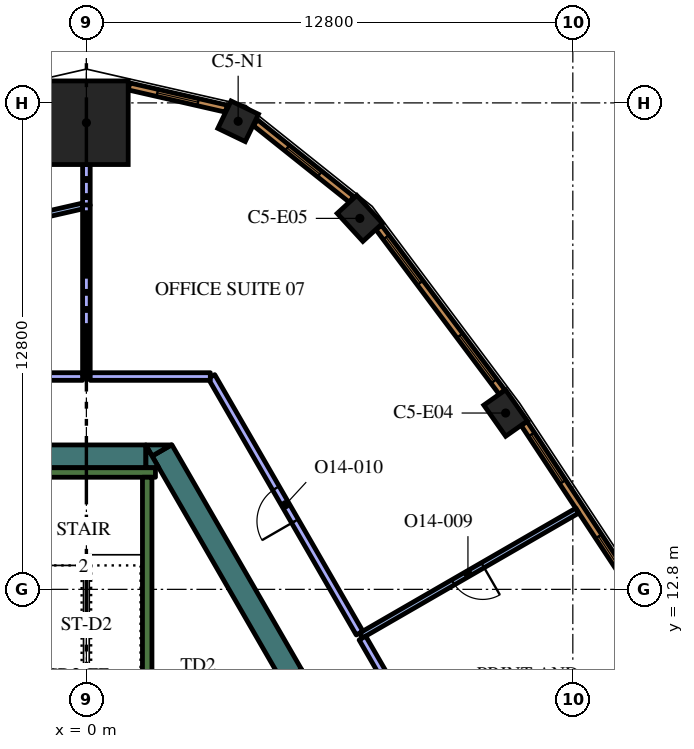
"""IFC4 building model, lengths in metres.
Left out: names, types, materials, properties, quantities, classifications, styles, units other than length and angle.
Written with IfcOpenShell. Run it as: python <this file> out.ifc"""

import sys

from ifc_helpers import new_model, si_unit, direction, frame, frame_2d, origin, origin_2d, place, context, subcontext, project, spatial, polyline, rectangle, outline, extrude, element, fill, save


model = new_model("IFC4")
c1 = context("Model", 3, precision=1e-05, world=origin(), true_north=direction((0.0, 1.0)))
c2 = subcontext(c1, "Body", "Model", "MODEL_VIEW")
j1 = project(units=[si_unit("LENGTHUNIT", "METRE"), si_unit("PLANEANGLEUNIT", "RADIAN")], contexts=[c1])
p1 = place(None, origin())
s1 = spatial("IfcSite", under=j1, at=p1, CompositionType="ELEMENT")
p2 = place(p1, origin())
s2 = spatial("IfcBuilding", under=s1, at=p2, CompositionType="ELEMENT")
p3 = place(p2, frame((0.0, 0.0, 304.8)))
s3 = spatial("IfcBuildingStorey", under=s2, at=p3, CompositionType="ELEMENT", Elevation=304.8)
p4 = place(p3, frame((0.0, 25.078, 0.0), z_axis=(0.0, 0.0, 1.0), x_axis=(0.0, 1.0, 0.0)))
e1 = element("IfcColumn", 1, at=p4, inside=s3, PredefinedType="COLUMN", context=c2, shape_type="SweptSolid", body=[
    extrude(rectangle(XDim=2.2, YDim=2.2, at=origin_2d()), origin(), (0.0, 0.0, 1.0), 4.2),
])
for number, where, z_axis, x_axis in (
    (2, (11.032, 17.44, 0.0), (0.0, 0.0, 1.0), (-0.575, 0.818, 0.0)),
    (3, (7.195, 22.561, 0.0), (0.0, 0.0, 1.0), (-0.676, 0.737, 0.0)),
):
    element("IfcColumn", number, at=place(p3, frame(where, z_axis=z_axis, x_axis=x_axis)), inside=s3, PredefinedType="COLUMN", context=c2, shape_type="SweptSolid", body=[
        extrude(rectangle(XDim=1.0, YDim=0.7, at=origin_2d()), origin(), (0.0, 0.0, 1.0), 4.2),
    ])
p5 = place(p3, frame((3.993, 25.116, 0.0), z_axis=(0.0, 0.0, 1.0), x_axis=(-0.900873321869, 0.434082086644, 0.0)))
e4 = element("IfcColumn", 4, at=p5, inside=s3, PredefinedType="COLUMN", context=c2, shape_type="SweptSolid", body=[
    extrude(rectangle(XDim=0.8, YDim=0.8, at=origin_2d()), origin(), (0.0, 0.0, 1.0), 4.2),
])
p6 = place(p3, frame((1.989, 16.456, 0.0), z_axis=(0.0, 0.0, 1.0), x_axis=(0.499973159588, -0.866040899549, 0.0)))
e5 = element("IfcWall", 5, at=p6, inside=s3, PredefinedType="SOLIDWALL", context=c2, shape_type="SweptSolid", body=[
    extrude(rectangle(XDim=6.828, YDim=0.6, at=frame_2d((3.414, 0.0))), origin(), (0.0, 0.0, 1.0), 4.2),
])
p7 = place(p3, origin())
e6 = element("IfcWall", 6, at=p7, inside=s3, PredefinedType="SOLIDWALL", context=c2, shape_type="SweptSolid", body=[
    extrude(outline(polyline([(1.559, 16.6), (2.235, 16.6), (1.728, 16.307), (1.559, 16.6)])), origin(), (0.0, 0.0, 1.0), 4.2),
])
p8 = place(p3, frame((-2.258, 16.3, 0.0), z_axis=(0.0, 0.0, 1.0), x_axis=(1.0, 0.0, 0.0)))
e7 = element("IfcWall", 7, at=p8, inside=s3, PredefinedType="SOLIDWALL", context=c2, shape_type="SweptSolid", body=[
    extrude(rectangle(XDim=3.823, YDim=0.6, at=frame_2d((1.912, 0.0))), origin(), (0.0, 0.0, 1.0), 4.2),
])
e8 = element("IfcWall", 8, at=p7, inside=s3, PredefinedType="SOLIDWALL", context=c2, shape_type="SweptSolid", body=[
    extrude(outline(polyline([(1.905, 16.0), (1.567, 16.0), (1.567, 16.585), (1.905, 16.0)])), origin(), (0.0, 0.0, 1.0), 4.2),
])
p9 = place(p3, frame((-1.817, 15.875, 0.0), z_axis=(0.0, 0.0, 1.0), x_axis=(1.0, 0.0, 0.0)))
e9 = element("IfcWall", 9, at=p9, inside=s3, PredefinedType="SOLIDWALL", context=c2, shape_type="SweptSolid", body=[
    extrude(rectangle(XDim=3.634, YDim=0.25, at=frame_2d((1.817, 0.0))), origin(), (0.0, 0.0, 1.0), 4.2),
])
p10 = place(p3, frame((1.6, 8.95, 0.0), z_axis=(0.0, 0.0, 1.0), x_axis=(0.0, 1.0, 0.0)))
e10 = element("IfcWall", 10, at=p10, inside=s3, PredefinedType="SOLIDWALL", context=c2, shape_type="SweptSolid", body=[
    extrude(rectangle(XDim=6.8, YDim=0.25, at=frame_2d((3.4, 0.0))), origin(), (0.0, 0.0, 1.0), 4.2),
])
p11 = place(p3, frame((12.918, 14.872, 0.0), z_axis=(0.0, 0.0, 1.0), x_axis=(-0.866033427365, -0.499986102494, 0.0)))
e11 = element("IfcWall", 11, at=p11, inside=s3, PredefinedType="PARTITIONING", context=c2, shape_type="SweptSolid", body=[
    extrude(rectangle(XDim=6.573, YDim=0.15, at=frame_2d((3.287, 0.0))), origin(), (0.0, 0.0, 1.0), 3.55),
])
p12 = place(p11, frame((2.873, 0.0, 0.0)))
e12 = element("IfcOpeningElement", 12, at=p12, cuts=e11, PredefinedType="OPENING", context=c2, shape_type="SweptSolid", body=[
    extrude(rectangle(XDim=0.9, YDim=2.1, at=frame_2d((0.45, 1.05))), frame((0.0, 0.085, 0.0), z_axis=(0.0, -1.0, 0.0), x_axis=(1.0, 0.0, 0.0)), (0.0, 0.0, 1.0), 0.17),
])
p13 = place(p3, frame((8.171, 9.948, 0.0), z_axis=(0.0, 0.0, 1.0), x_axis=(-0.500044545065, 0.865999684151, 0.0)))
e13 = element("IfcWall", 13, at=p13, inside=s3, PredefinedType="PARTITIONING", context=c2, shape_type="SweptSolid", body=[
    extrude(rectangle(XDim=1.815, YDim=0.2, at=frame_2d((0.908, 0.0))), origin(), (0.0, 0.0, 1.0), 3.55),
])
p14 = place(p3, frame((0.0, 22.906, 0.0), z_axis=(0.0, 0.0, 1.0), x_axis=(0.0, 1.0, 0.0)))
e14 = element("IfcWall", 14, at=p14, inside=s3, PredefinedType="PARTITIONING", context=c2, shape_type="SweptSolid", body=[
    extrude(rectangle(XDim=1.072, YDim=0.2, at=frame_2d((0.536, 0.0))), origin(), (0.0, 0.0, 1.0), 3.55),
])
p15 = place(p3, frame((0.0, 18.4, 0.0), z_axis=(0.0, 0.0, 1.0), x_axis=(0.0, 1.0, 0.0)))
e15 = element("IfcWall", 15, at=p15, inside=s3, PredefinedType="PARTITIONING", context=c2, shape_type="SweptSolid", body=[
    extrude(rectangle(XDim=4.514, YDim=0.2, at=frame_2d((2.257, 0.0))), origin(), (0.0, 0.0, 1.0), 3.55),
])
p16 = place(p3, frame((7.188, 11.65, 0.0), z_axis=(0.0, 0.0, 1.0), x_axis=(-0.499986368499, 0.866033273792, 0.0)))
e16 = element("IfcWall", 16, at=p16, inside=s3, PredefinedType="PARTITIONING", context=c2, shape_type="SweptSolid", body=[
    extrude(rectangle(XDim=7.794, YDim=0.2, at=frame_2d((3.897, 0.0))), origin(), (0.0, 0.0, 1.0), 3.55),
])
p17 = place(p16, frame((3.4, 0.0, 0.0)))
e17 = element("IfcOpeningElement", 17, at=p17, cuts=e16, PredefinedType="OPENING", context=c2, shape_type="SweptSolid", body=[
    extrude(rectangle(XDim=1.0, YDim=2.1, at=frame_2d((0.5, 1.05))), frame((0.0, 0.11, 0.0), z_axis=(0.0, -1.0, 0.0), x_axis=(1.0, 0.0, 0.0)), (0.0, 0.0, 1.0), 0.22),
])
p18 = place(p3, frame((3.261, 18.4, 0.0), z_axis=(0.0, 0.0, 1.0), x_axis=(-1.0, 0.0, 0.0)))
e18 = element("IfcWall", 18, at=p18, inside=s3, PredefinedType="PARTITIONING", context=c2, shape_type="SweptSolid", body=[
    extrude(rectangle(XDim=3.161, YDim=0.2, at=frame_2d((1.581, 0.0))), origin(), (0.0, 0.0, 1.0), 3.55),
])
p19 = place(p3, frame((-0.1, 22.887, 0.0), z_axis=(0.0, 0.0, 1.0), x_axis=(-0.974895716418, -0.222661945805, 0.0)))
e19 = element("IfcWall", 19, at=p19, inside=s3, PredefinedType="PARTITIONING", context=c2, shape_type="SweptSolid", body=[
    extrude(rectangle(XDim=2.605, YDim=0.15, at=frame_2d((1.303, 0.0))), origin(), (0.0, 0.0, 1.0), 3.55),
])
p20 = place(p3, frame((-0.1, 18.4, 0.0), z_axis=(0.0, 0.0, 1.0), x_axis=(-1.0, 0.0, 0.0)))
e20 = element("IfcWall", 20, at=p20, inside=s3, PredefinedType="PARTITIONING", context=c2, shape_type="SweptSolid", body=[
    extrude(rectangle(XDim=3.191, YDim=0.2, at=frame_2d((1.595, 0.0))), origin(), (0.0, 0.0, 1.0), 3.55),
])
p21 = place(p3, frame((14.496, 12.653, 0.0), z_axis=(0.0, 0.0, 1.0), x_axis=(-0.550744054781, 0.83467417962, 0.0)))
e21 = element("IfcWall", 21, at=p21, inside=s3, PredefinedType="SOLIDWALL", context=c2, shape_type="SweptSolid", body=[
    extrude(rectangle(XDim=5.406, YDim=0.19, at=frame_2d((2.703, 0.0))), origin(), (0.0, 0.0, 1.0), 3.95),
])
p22 = place(p21, frame((0.346, 0.0, 0.6)))
e22 = element("IfcOpeningElement", 22, at=p22, cuts=e21, PredefinedType="OPENING", context=c2, shape_type="SweptSolid", body=[
    extrude(rectangle(XDim=1.5, YDim=2.85, at=frame_2d((0.75, 1.425))), frame((0.0, 0.105, 0.0), z_axis=(0.0, -1.0, 0.0), x_axis=(1.0, 0.0, 0.0)), (0.0, 0.0, 1.0), 0.21),
])
p23 = place(p21, frame((3.559, 0.0, 0.6)))
e23 = element("IfcOpeningElement", 23, at=p23, cuts=e21, PredefinedType="OPENING", context=c2, shape_type="SweptSolid", body=[
    extrude(rectangle(XDim=1.5, YDim=2.85, at=frame_2d((0.75, 1.425))), frame((0.0, 0.105, 0.0), z_axis=(0.0, -1.0, 0.0), x_axis=(1.0, 0.0, 0.0)), (0.0, 0.0, 1.0), 0.21),
])
p24 = place(p3, frame((10.938, 17.99, 0.0), z_axis=(0.0, 0.0, 1.0), x_axis=(-0.599559865294, 0.800329911929, 0.0)))
e24 = element("IfcWall", 24, at=p24, inside=s3, PredefinedType="SOLIDWALL", context=c2, shape_type="SweptSolid", body=[
    extrude(rectangle(XDim=5.415, YDim=0.19, at=frame_2d((2.708, 0.0))), origin(), (0.0, 0.0, 1.0), 3.95),
])
p25 = place(p24, frame((0.358, 0.0, 0.6)))
e25 = element("IfcOpeningElement", 25, at=p25, cuts=e24, PredefinedType="OPENING", context=c2, shape_type="SweptSolid", body=[
    extrude(rectangle(XDim=1.5, YDim=2.85, at=frame_2d((0.75, 1.425))), frame((0.0, 0.105, 0.0), z_axis=(0.0, -1.0, 0.0), x_axis=(1.0, 0.0, 0.0)), (0.0, 0.0, 1.0), 0.21),
])
p26 = place(p24, frame((3.593, 0.0, 0.6)))
e26 = element("IfcOpeningElement", 26, at=p26, cuts=e24, PredefinedType="OPENING", context=c2, shape_type="SweptSolid", body=[
    extrude(rectangle(XDim=1.5, YDim=2.85, at=frame_2d((0.75, 1.425))), frame((0.0, 0.105, 0.0), z_axis=(0.0, -1.0, 0.0), x_axis=(1.0, 0.0, 0.0)), (0.0, 0.0, 1.0), 0.21),
])
p27 = place(p3, frame((6.977, 23.061, 0.0), z_axis=(0.0, 0.0, 1.0), x_axis=(-0.781626234064, 0.623747088349, 0.0)))
e27 = element("IfcWall", 27, at=p27, inside=s3, PredefinedType="SOLIDWALL", context=c2, shape_type="SweptSolid", body=[
    extrude(rectangle(XDim=3.237, YDim=0.19, at=frame_2d((1.618, 0.0))), origin(), (0.0, 0.0, 1.0), 3.95),
])
p28 = place(p27, frame((1.068, 0.0, 0.6)))
e28 = element("IfcOpeningElement", 28, at=p28, cuts=e27, PredefinedType="OPENING", context=c2, shape_type="SweptSolid", body=[
    extrude(rectangle(XDim=1.1, YDim=2.85, at=frame_2d((0.55, 1.425))), frame((0.0, 0.105, 0.0), z_axis=(0.0, -1.0, 0.0), x_axis=(1.0, 0.0, 0.0)), (0.0, 0.0, 1.0), 0.21),
])
p29 = place(p3, frame((3.683, 25.449, 0.0), z_axis=(0.0, 0.0, 1.0), x_axis=(-0.974913273386, 0.222585060988, 0.0)))
e29 = element("IfcWall", 29, at=p29, inside=s3, PredefinedType="SOLIDWALL", context=c2, shape_type="SweptSolid", body=[
    extrude(rectangle(XDim=2.627, YDim=0.19, at=frame_2d((1.313, 0.0))), origin(), (0.0, 0.0, 1.0), 3.95),
])
p30 = place(p29, frame((0.763, 0.0, 0.6)))
e30 = element("IfcOpeningElement", 30, at=p30, cuts=e29, PredefinedType="OPENING", context=c2, shape_type="SweptSolid", body=[
    extrude(rectangle(XDim=1.1, YDim=2.85, at=frame_2d((0.55, 1.425))), frame((0.0, 0.105, 0.0), z_axis=(0.0, -1.0, 0.0), x_axis=(1.0, 0.0, 0.0)), (0.0, 0.0, 1.0), 0.21),
])
p31 = place(p12, origin())
e31 = element("IfcDoor", 31, at=p31, inside=s3, OperationType="SINGLE_SWING_RIGHT", PredefinedType="DOOR", context=c2, shape_type="SweptSolid", body=[
    extrude(rectangle(XDim=0.9, YDim=2.1, at=frame_2d((0.45, 1.05))), frame((0.0, 0.025, 0.0), z_axis=(0.0, -1.0, 0.0), x_axis=(1.0, 0.0, 0.0)), (0.0, 0.0, 1.0), 0.05),
])
fill(e12, e31)
p32 = place(p17, origin())
e32 = element("IfcDoor", 32, at=p32, inside=s3, OperationType="SINGLE_SWING_RIGHT", PredefinedType="DOOR", context=c2, shape_type="SweptSolid", body=[
    extrude(rectangle(XDim=1.0, YDim=2.1, at=frame_2d((0.5, 1.05))), frame((0.0, 0.025, 0.0), z_axis=(0.0, -1.0, 0.0), x_axis=(1.0, 0.0, 0.0)), (0.0, 0.0, 1.0), 0.05),
])
fill(e17, e32)
p33 = place(p22, origin())
e33 = element("IfcWindow", 33, at=p33, inside=s3, PartitioningType="SINGLE_PANEL", PredefinedType="WINDOW", context=c2, shape_type="SweptSolid", body=[
    extrude(rectangle(XDim=1.5, YDim=2.85, at=frame_2d((0.75, 1.425))), frame((0.0, 0.045, 0.0), z_axis=(0.0, -1.0, 0.0), x_axis=(1.0, 0.0, 0.0)), (0.0, 0.0, 1.0), 0.06),
])
fill(e22, e33)
p34 = place(p23, origin())
e34 = element("IfcWindow", 34, at=p34, inside=s3, PartitioningType="SINGLE_PANEL", PredefinedType="WINDOW", context=c2, shape_type="SweptSolid", body=[
    extrude(rectangle(XDim=1.5, YDim=2.85, at=frame_2d((0.75, 1.425))), frame((0.0, 0.045, 0.0), z_axis=(0.0, -1.0, 0.0), x_axis=(1.0, 0.0, 0.0)), (0.0, 0.0, 1.0), 0.06),
])
fill(e23, e34)
p35 = place(p25, origin())
e35 = element("IfcWindow", 35, at=p35, inside=s3, PartitioningType="SINGLE_PANEL", PredefinedType="WINDOW", context=c2, shape_type="SweptSolid", body=[
    extrude(rectangle(XDim=1.5, YDim=2.85, at=frame_2d((0.75, 1.425))), frame((0.0, 0.045, 0.0), z_axis=(0.0, -1.0, 0.0), x_axis=(1.0, 0.0, 0.0)), (0.0, 0.0, 1.0), 0.06),
])
fill(e25, e35)
p36 = place(p26, origin())
e36 = element("IfcWindow", 36, at=p36, inside=s3, PartitioningType="SINGLE_PANEL", PredefinedType="WINDOW", context=c2, shape_type="SweptSolid", body=[
    extrude(rectangle(XDim=1.5, YDim=2.85, at=frame_2d((0.75, 1.425))), frame((0.0, 0.045, 0.0), z_axis=(0.0, -1.0, 0.0), x_axis=(1.0, 0.0, 0.0)), (0.0, 0.0, 1.0), 0.06),
])
fill(e26, e36)
p37 = place(p28, origin())
e37 = element("IfcWindow", 37, at=p37, inside=s3, PartitioningType="SINGLE_PANEL", PredefinedType="WINDOW", context=c2, shape_type="SweptSolid", body=[
    extrude(rectangle(XDim=1.1, YDim=2.85, at=frame_2d((0.55, 1.425))), frame((0.0, 0.045, 0.0), z_axis=(0.0, -1.0, 0.0), x_axis=(1.0, 0.0, 0.0)), (0.0, 0.0, 1.0), 0.06),
])
fill(e28, e37)
p38 = place(p30, origin())
e38 = element("IfcWindow", 38, at=p38, inside=s3, PartitioningType="SINGLE_PANEL", PredefinedType="WINDOW", context=c2, shape_type="SweptSolid", body=[
    extrude(rectangle(XDim=1.1, YDim=2.85, at=frame_2d((0.55, 1.425))), frame((0.0, 0.045, 0.0), z_axis=(0.0, -1.0, 0.0), x_axis=(1.0, 0.0, 0.0)), (0.0, 0.0, 1.0), 0.06),
])
fill(e30, e38)
save(model, sys.argv[1])
